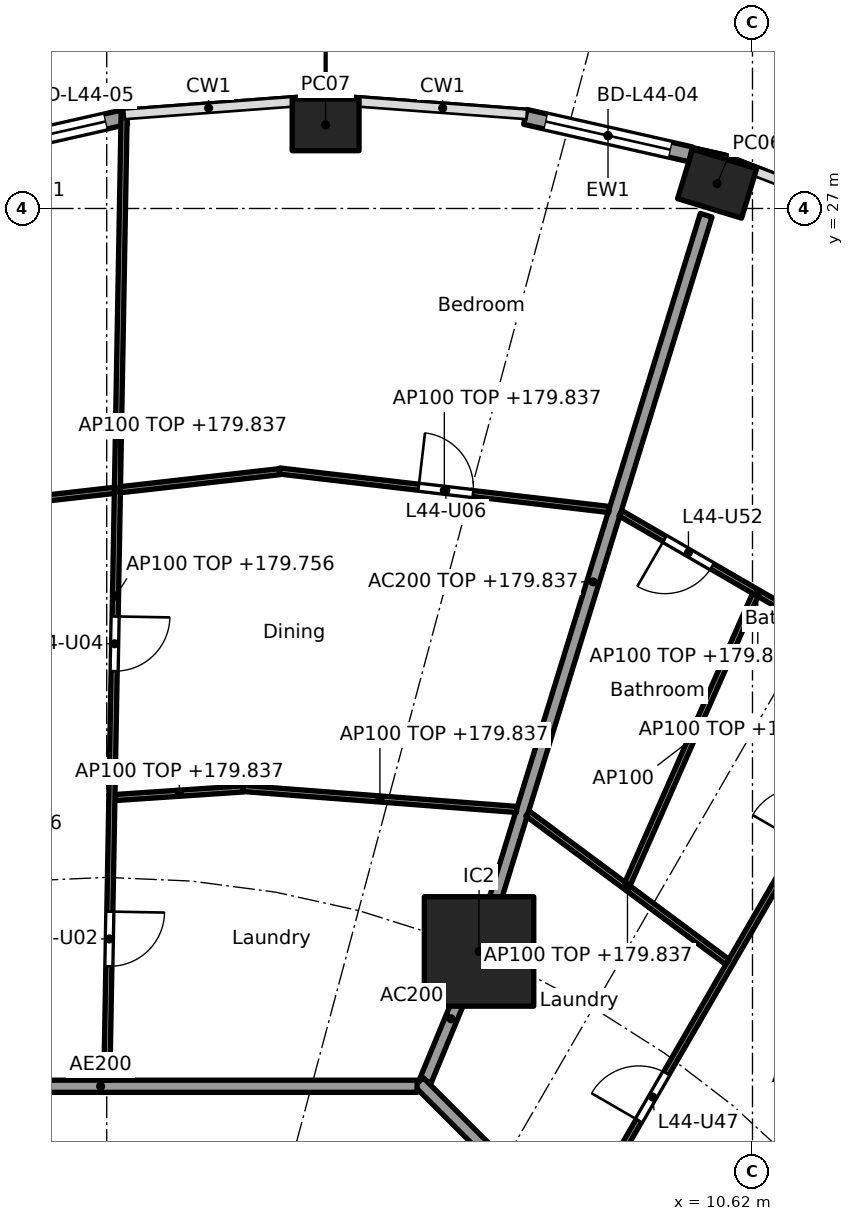
"""IFC4 building model, lengths in metres.
Left out: names, types, materials, properties, quantities, classifications, styles, units other than length and angle.
Written with IfcOpenShell. Run it as: python <this file> out.ifc"""

import sys

from ifc_helpers import new_model, si_unit, direction, frame, frame_2d, origin, origin_2d, place, context, subcontext, project, spatial, rectangle, hollow_rectangle, extrude, element, fill, save


model = new_model("IFC4")
c1 = context("Model", 3, precision=1e-05, world=origin(), true_north=direction((0.0, 1.0)))
c2 = subcontext(c1, "Body", "Model", "MODEL_VIEW")
j1 = project(units=[si_unit("LENGTHUNIT", "METRE"), si_unit("PLANEANGLEUNIT", "RADIAN")], contexts=[c1])
p1 = place(None, origin())
s1 = spatial("IfcSite", under=j1, at=p1, CompositionType="ELEMENT")
p2 = place(p1, origin())
s2 = spatial("IfcBuilding", under=s1, at=p2, CompositionType="ELEMENT")
p3 = place(p2, frame((0.0, 0.0, 177.0)))
s3 = spatial("IfcBuildingStorey", under=s2, at=p3, CompositionType="ELEMENT", Elevation=177.0)
for number, where, z_axis, x_axis in (
    (1, (10.038, 27.408, 0.0), (0.0, 0.0, 1.0), (-0.957, 0.292, 0.0)),
    (2, (3.6, 28.375, 0.0), (0.0, 0.0, 1.0), (-1.0, 0.0, 0.0)),
):
    element("IfcColumn", number, at=place(p3, frame(where, z_axis=z_axis, x_axis=x_axis)), inside=s3, PredefinedType="COLUMN", context=c2, shape_type="SweptSolid", body=[
        extrude(hollow_rectangle(XDim=1.1, YDim=0.85, WallThickness=0.036, at=origin_2d()), origin(), (0.0, 0.0, 1.0), 3.7),
    ])
p4 = place(p3, frame((6.123, 14.782, 0.0), z_axis=(0.0, 0.0, 1.0), x_axis=(1.0, 0.0, 0.0)))
e3 = element("IfcColumn", 3, at=p4, inside=s3, PredefinedType="COLUMN", context=c2, shape_type="SweptSolid", body=[
    extrude(rectangle(XDim=1.8, YDim=1.8, at=origin_2d()), origin(), (0.0, 0.0, 1.0), 3.7),
])
p5 = place(p3, frame((6.885, 28.506, 0.0), z_axis=(0.0, 0.0, 1.0), x_axis=(0.975324329911, -0.220776926974, 0.0)))
e4 = element("IfcWall", 4, at=p5, inside=s3, PredefinedType="SOLIDWALL", context=c2, shape_type="SweptSolid", body=[
    extrude(rectangle(XDim=2.788, YDim=0.25, at=frame_2d((1.394, 0.0))), origin(), (0.0, 0.0, 1.0), 3.44),
])
p6 = place(p5, frame((0.344, 0.0, 0.0)))
e5 = element("IfcOpeningElement", 5, at=p6, cuts=e4, PredefinedType="OPENING", context=c2, shape_type="SweptSolid", body=[
    extrude(rectangle(XDim=2.1, YDim=2.4, at=frame_2d((1.05, 1.2))), frame((0.0, 0.135, 0.0), z_axis=(0.0, -1.0, 0.0), x_axis=(1.0, 0.0, 0.0)), (0.0, 0.0, 1.0), 0.27),
])
p7 = place(p3, frame((-2.404, 27.891, 0.0), z_axis=(0.0, 0.0, 1.0), x_axis=(0.975324329911, 0.220776926974, 0.0)))
e6 = element("IfcWall", 6, at=p7, inside=s3, PredefinedType="SOLIDWALL", context=c2, shape_type="SweptSolid", body=[
    extrude(rectangle(XDim=2.788, YDim=0.25, at=frame_2d((1.394, 0.0))), origin(), (0.0, 0.0, 1.0), 3.44),
])
p8 = place(p7, frame((0.344, 0.0, 0.0)))
e7 = element("IfcOpeningElement", 7, at=p8, cuts=e6, PredefinedType="OPENING", context=c2, shape_type="SweptSolid", body=[
    extrude(rectangle(XDim=2.1, YDim=2.4, at=frame_2d((1.05, 1.2))), frame((0.0, 0.135, 0.0), z_axis=(0.0, -1.0, 0.0), x_axis=(1.0, 0.0, 0.0)), (0.0, 0.0, 1.0), 0.27),
])
p9 = place(p3, frame((5.243, 12.657, 0.0), z_axis=(0.0, 0.0, 1.0), x_axis=(0.382747093259, 0.923853160736, 0.0)))
e8 = element("IfcWall", 8, at=p9, inside=s3, PredefinedType="PARTITIONING", context=c2, shape_type="SweptSolid", body=[
    extrude(rectangle(XDim=2.2, YDim=0.2, at=frame_2d((1.1, 0.0))), origin(), (0.0, 0.0, 1.0), 3.44),
])
p10 = place(p3, frame((6.138, 14.83, 0.0), z_axis=(0.0, 0.0, 1.0), x_axis=(0.294818517221, 0.955553264818, 0.0)))
e9 = element("IfcWall", 9, at=p10, inside=s3, PredefinedType="PARTITIONING", context=c2, shape_type="SweptSolid", body=[
    extrude(rectangle(XDim=12.619, YDim=0.2, at=frame_2d((6.31, 0.0))), origin(), (0.0, 0.0, 1.0), 2.837),
])
p11 = place(p3, frame((12.635, 5.134, 0.0), z_axis=(0.0, 0.0, 1.0), x_axis=(-0.707106781187, 0.707106781187, 0.0)))
e10 = element("IfcWall", 10, at=p11, inside=s3, PredefinedType="PARTITIONING", context=c2, shape_type="SweptSolid", body=[
    extrude(rectangle(XDim=10.609, YDim=0.2, at=frame_2d((5.305, 0.0))), origin(), (0.0, 0.0, 1.0), 3.44),
])
p12 = place(p11, frame((4.804, 0.0, 0.0)))
e11 = element("IfcOpeningElement", 11, at=p12, cuts=e10, PredefinedType="OPENING", context=c2, shape_type="SweptSolid", body=[
    extrude(rectangle(XDim=1.0, YDim=2.1, at=frame_2d((0.5, 1.05))), frame((0.0, 0.11, 0.0), z_axis=(0.0, -1.0, 0.0), x_axis=(1.0, 0.0, 0.0)), (0.0, 0.0, 1.0), 0.22),
])
p13 = place(p3, frame((5.104, 12.565, 0.0), z_axis=(0.0, 0.0, 1.0), x_axis=(-1.0, 0.0, 0.0)))
e12 = element("IfcWall", 12, at=p13, inside=s3, PredefinedType="PARTITIONING", context=c2, shape_type="SweptSolid", body=[
    extrude(rectangle(XDim=10.409, YDim=0.2, at=frame_2d((5.205, 0.0))), origin(), (0.0, 0.0, 1.0), 3.44),
])
p14 = place(p13, frame((6.339, 0.0, 0.0)))
e13 = element("IfcOpeningElement", 13, at=p14, cuts=e12, PredefinedType="OPENING", context=c2, shape_type="SweptSolid", body=[
    extrude(rectangle(XDim=1.0, YDim=2.1, at=frame_2d((0.5, 1.05))), frame((0.0, 0.11, 0.0), z_axis=(0.0, -1.0, 0.0), x_axis=(1.0, 0.0, 0.0)), (0.0, 0.0, 1.0), 0.22),
])
p15 = place(p3, frame((10.178, 7.732, 0.0), z_axis=(0.0, 0.0, 1.0), x_axis=(0.667280084362, 0.744806880348, 0.0)))
e14 = element("IfcWall", 14, at=p15, inside=s3, PredefinedType="PARTITIONING", context=c2, shape_type="SweptSolid", body=[
    extrude(rectangle(XDim=10.572, YDim=0.1, at=frame_2d((5.286, 0.0))), origin(), (0.0, 0.0, 1.0), 2.756),
])
p16 = place(p15, frame((2.07, 0.0, 0.0)))
e15 = element("IfcOpeningElement", 15, at=p16, cuts=e14, PredefinedType="OPENING", context=c2, shape_type="SweptSolid", body=[
    extrude(rectangle(XDim=0.9, YDim=2.1, at=frame_2d((0.45, 1.05))), frame((0.0, 0.06, 0.0), z_axis=(0.0, -1.0, 0.0), x_axis=(1.0, 0.0, 0.0)), (0.0, 0.0, 1.0), 0.12),
])
p17 = place(p15, frame((7.331, 0.0, 0.0)))
e16 = element("IfcOpeningElement", 16, at=p17, cuts=e14, PredefinedType="OPENING", context=c2, shape_type="SweptSolid", body=[
    extrude(rectangle(XDim=0.9, YDim=2.1, at=frame_2d((0.45, 1.05))), frame((0.0, 0.06, 0.0), z_axis=(0.0, -1.0, 0.0), x_axis=(1.0, 0.0, 0.0)), (0.0, 0.0, 1.0), 0.12),
])
p18 = place(p3, frame((7.708, 10.198, 0.0), z_axis=(0.0, 0.0, 1.0), x_axis=(0.501305229744, 0.865270516446, 0.0)))
e17 = element("IfcWall", 17, at=p18, inside=s3, PredefinedType="PARTITIONING", context=c2, shape_type="SweptSolid", body=[
    extrude(rectangle(XDim=16.064, YDim=0.1, at=frame_2d((8.032, 0.0))), origin(), (0.0, 0.0, 1.0), 2.756),
])
p19 = place(p18, frame((2.082, 0.0, 0.0)))
e18 = element("IfcOpeningElement", 18, at=p19, cuts=e17, PredefinedType="OPENING", context=c2, shape_type="SweptSolid", body=[
    extrude(rectangle(XDim=0.9, YDim=2.1, at=frame_2d((0.45, 1.05))), frame((0.0, 0.06, 0.0), z_axis=(0.0, -1.0, 0.0), x_axis=(1.0, 0.0, 0.0)), (0.0, 0.0, 1.0), 0.12),
])
p20 = place(p18, frame((7.369, 0.0, 0.0)))
e19 = element("IfcOpeningElement", 19, at=p20, cuts=e17, PredefinedType="OPENING", context=c2, shape_type="SweptSolid", body=[
    extrude(rectangle(XDim=0.9, YDim=2.1, at=frame_2d((0.45, 1.05))), frame((0.0, 0.06, 0.0), z_axis=(0.0, -1.0, 0.0), x_axis=(1.0, 0.0, 0.0)), (0.0, 0.0, 1.0), 0.12),
])
p21 = place(p18, frame((12.869, 0.0, 0.0)))
e20 = element("IfcOpeningElement", 20, at=p21, cuts=e17, PredefinedType="OPENING", context=c2, shape_type="SweptSolid", body=[
    extrude(rectangle(XDim=0.9, YDim=2.1, at=frame_2d((0.45, 1.05))), frame((0.0, 0.06, 0.0), z_axis=(0.0, -1.0, 0.0), x_axis=(1.0, 0.0, 0.0)), (0.0, 0.0, 1.0), 0.12),
])
p22 = place(p3, frame((10.207, 14.61, 0.0), z_axis=(0.0, 0.0, 1.0), x_axis=(-0.802769141821, 0.596289950394, 0.0)))
e21 = element("IfcWall", 21, at=p22, inside=s3, PredefinedType="PARTITIONING", context=c2, shape_type="SweptSolid", body=[
    extrude(rectangle(XDim=4.092, YDim=0.1, at=frame_2d((2.046, 0.0))), origin(), (0.0, 0.0, 1.0), 2.837),
])
p23 = place(p3, frame((12.965, 19.371, 0.0), z_axis=(0.0, 0.0, 1.0), x_axis=(-0.865286427811, 0.501277765163, 0.0)))
e22 = element("IfcWall", 22, at=p23, inside=s3, PredefinedType="PARTITIONING", context=c2, shape_type="SweptSolid", body=[
    extrude(rectangle(XDim=5.22, YDim=0.1, at=frame_2d((2.61, 0.0))), origin(), (0.0, 0.0, 1.0), 2.837),
])
p24 = place(p23, frame((3.478, 0.0, 0.0)))
e23 = element("IfcOpeningElement", 23, at=p24, cuts=e22, PredefinedType="OPENING", context=c2, shape_type="SweptSolid", body=[
    extrude(rectangle(XDim=0.9, YDim=2.1, at=frame_2d((0.45, 1.05))), frame((0.0, 0.06, 0.0), z_axis=(0.0, -1.0, 0.0), x_axis=(1.0, 0.0, 0.0)), (0.0, 0.0, 1.0), 0.12),
])
p25 = place(p3, frame((8.564, 15.89, 0.0), z_axis=(0.0, 0.0, 1.0), x_axis=(0.404011266873, 0.914754008595, 0.0)))
e24 = element("IfcWall", 24, at=p25, inside=s3, PredefinedType="PARTITIONING", context=c2, shape_type="SweptSolid", body=[
    extrude(rectangle(XDim=5.199, YDim=0.1, at=frame_2d((2.6, 0.0))), origin(), (0.0, 0.0, 1.0), 3.44),
])
p26 = place(p3, frame((6.741, 17.117, 0.0), z_axis=(0.0, 0.0, 1.0), x_axis=(-0.997078320723, 0.076386008825, 0.0)))
e25 = element("IfcWall", 25, at=p26, inside=s3, PredefinedType="PARTITIONING", context=c2, shape_type="SweptSolid", body=[
    extrude(rectangle(XDim=4.51, YDim=0.1, at=frame_2d((2.255, 0.0))), origin(), (0.0, 0.0, 1.0), 2.837),
])
p27 = place(p3, frame((8.262, 22.05, 0.0), z_axis=(0.0, 0.0, 1.0), x_axis=(-0.993250089265, 0.115992500516, 0.0)))
e26 = element("IfcWall", 26, at=p27, inside=s3, PredefinedType="PARTITIONING", context=c2, shape_type="SweptSolid", body=[
    extrude(rectangle(XDim=5.458, YDim=0.1, at=frame_2d((2.729, 0.0))), origin(), (0.0, 0.0, 1.0), 2.837),
])
p28 = place(p27, frame((2.254, 0.0, 0.0)))
e27 = element("IfcOpeningElement", 27, at=p28, cuts=e26, PredefinedType="OPENING", context=c2, shape_type="SweptSolid", body=[
    extrude(rectangle(XDim=0.9, YDim=2.1, at=frame_2d((0.45, 1.05))), frame((0.0, 0.06, 0.0), z_axis=(0.0, -1.0, 0.0), x_axis=(1.0, 0.0, 0.0)), (0.0, 0.0, 1.0), 0.12),
])
p29 = place(p3, frame((2.244, 17.455, 0.0), z_axis=(0.0, 0.0, 1.0), x_axis=(-0.997756833447, -0.06694252243, 0.0)))
e28 = element("IfcWall", 28, at=p29, inside=s3, PredefinedType="PARTITIONING", context=c2, shape_type="SweptSolid", body=[
    extrude(rectangle(XDim=2.104, YDim=0.1, at=frame_2d((1.052, 0.0))), origin(), (0.0, 0.0, 1.0), 2.837),
])
p30 = place(p3, frame((2.842, 22.671, 0.0), z_axis=(0.0, 0.0, 1.0), x_axis=(-0.993660315081, -0.112424099879, 0.0)))
e29 = element("IfcWall", 29, at=p30, inside=s3, PredefinedType="PARTITIONING", context=c2, shape_type="SweptSolid", body=[
    extrude(rectangle(XDim=5.325, YDim=0.1, at=frame_2d((2.662, 0.0))), origin(), (0.0, 0.0, 1.0), 2.837),
])
p31 = place(p3, frame((0.002, 12.665, 0.0), z_axis=(0.0, 0.0, 1.0), x_axis=(0.01792079652, 0.999839409631, 0.0)))
e30 = element("IfcWall", 30, at=p31, inside=s3, PredefinedType="PARTITIONING", context=c2, shape_type="SweptSolid", body=[
    extrude(rectangle(XDim=15.926, YDim=0.1, at=frame_2d((7.963, 0.0))), origin(), (0.0, 0.0, 1.0), 2.756),
])
p32 = place(p31, frame((1.873, 0.0, 0.0)))
e31 = element("IfcOpeningElement", 31, at=p32, cuts=e30, PredefinedType="OPENING", context=c2, shape_type="SweptSolid", body=[
    extrude(rectangle(XDim=0.9, YDim=2.1, at=frame_2d((0.45, 1.05))), frame((0.0, 0.06, 0.0), z_axis=(0.0, -1.0, 0.0), x_axis=(1.0, 0.0, 0.0)), (0.0, 0.0, 1.0), 0.12),
])
p33 = place(p31, frame((6.728, 0.0, 0.0)))
e32 = element("IfcOpeningElement", 32, at=p33, cuts=e30, PredefinedType="OPENING", context=c2, shape_type="SweptSolid", body=[
    extrude(rectangle(XDim=0.9, YDim=2.1, at=frame_2d((0.45, 1.05))), frame((0.0, 0.06, 0.0), z_axis=(0.0, -1.0, 0.0), x_axis=(1.0, 0.0, 0.0)), (0.0, 0.0, 1.0), 0.12),
])
p34 = place(p6, origin())
e33 = element("IfcDoor", 33, at=p34, inside=s3, OperationType="SLIDING_TO_LEFT", PredefinedType="DOOR", context=c2, shape_type="SweptSolid", body=[
    extrude(rectangle(XDim=2.1, YDim=2.4, at=frame_2d((1.05, 1.2))), frame((0.0, 0.025, 0.0), z_axis=(0.0, -1.0, 0.0), x_axis=(1.0, 0.0, 0.0)), (0.0, 0.0, 1.0), 0.05),
])
fill(e5, e33)
p35 = place(p8, origin())
e34 = element("IfcDoor", 34, at=p35, inside=s3, OperationType="SLIDING_TO_LEFT", PredefinedType="DOOR", context=c2, shape_type="SweptSolid", body=[
    extrude(rectangle(XDim=2.1, YDim=2.4, at=frame_2d((1.05, 1.2))), frame((0.0, 0.025, 0.0), z_axis=(0.0, -1.0, 0.0), x_axis=(1.0, 0.0, 0.0)), (0.0, 0.0, 1.0), 0.05),
])
fill(e7, e34)
p36 = place(p32, frame((0.9, 0.0, 0.0), x_axis=(-1.0, 0.0, 0.0)))
e35 = element("IfcDoor", 35, at=p36, inside=s3, OperationType="SINGLE_SWING_LEFT", PredefinedType="DOOR", context=c2, shape_type="SweptSolid", body=[
    extrude(rectangle(XDim=0.9, YDim=2.1, at=frame_2d((0.45, 1.05))), frame((0.0, 0.025, 0.0), z_axis=(0.0, -1.0, 0.0), x_axis=(1.0, 0.0, 0.0)), (0.0, 0.0, 1.0), 0.05),
])
fill(e31, e35)
p37 = place(p33, frame((0.9, 0.0, 0.0), x_axis=(-1.0, 0.0, 0.0)))
e36 = element("IfcDoor", 36, at=p37, inside=s3, OperationType="SINGLE_SWING_LEFT", PredefinedType="DOOR", context=c2, shape_type="SweptSolid", body=[
    extrude(rectangle(XDim=0.9, YDim=2.1, at=frame_2d((0.45, 1.05))), frame((0.0, 0.025, 0.0), z_axis=(0.0, -1.0, 0.0), x_axis=(1.0, 0.0, 0.0)), (0.0, 0.0, 1.0), 0.05),
])
fill(e32, e36)
p38 = place(p28, frame((0.9, 0.0, 0.0), x_axis=(-1.0, 0.0, 0.0)))
e37 = element("IfcDoor", 37, at=p38, inside=s3, OperationType="SINGLE_SWING_LEFT", PredefinedType="DOOR", context=c2, shape_type="SweptSolid", body=[
    extrude(rectangle(XDim=0.9, YDim=2.1, at=frame_2d((0.45, 1.05))), frame((0.0, 0.025, 0.0), z_axis=(0.0, -1.0, 0.0), x_axis=(1.0, 0.0, 0.0)), (0.0, 0.0, 1.0), 0.05),
])
fill(e27, e37)
p39 = place(p19, origin())
e38 = element("IfcDoor", 38, at=p39, inside=s3, OperationType="SINGLE_SWING_LEFT", PredefinedType="DOOR", context=c2, shape_type="SweptSolid", body=[
    extrude(rectangle(XDim=0.9, YDim=2.1, at=frame_2d((0.45, 1.05))), frame((0.0, 0.025, 0.0), z_axis=(0.0, -1.0, 0.0), x_axis=(1.0, 0.0, 0.0)), (0.0, 0.0, 1.0), 0.05),
])
fill(e18, e38)
p40 = place(p24, origin())
e39 = element("IfcDoor", 39, at=p40, inside=s3, OperationType="SINGLE_SWING_RIGHT", PredefinedType="DOOR", context=c2, shape_type="SweptSolid", body=[
    extrude(rectangle(XDim=0.9, YDim=2.1, at=frame_2d((0.45, 1.05))), frame((0.0, 0.025, 0.0), z_axis=(0.0, -1.0, 0.0), x_axis=(1.0, 0.0, 0.0)), (0.0, 0.0, 1.0), 0.05),
])
fill(e23, e39)
save(model, sys.argv[1])
